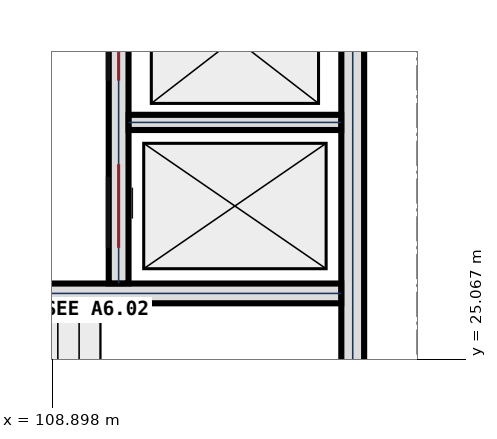
"""IFC4 building model, lengths in metres.
Left out: names, types, materials, properties, quantities, classifications, styles, units other than length and angle.
Written with IfcOpenShell. Run it as: python <this file> out.ifc"""

import sys

from ifc_helpers import new_model, si_unit, direction, frame, frame_2d, origin, place, context, subcontext, project, spatial, rectangle, extrude, element, fill, save


model = new_model("IFC4")
c1 = context("Model", 3, precision=1e-05, world=origin(), true_north=direction((0.0, 1.0)))
c2 = subcontext(c1, "Body", "Model", "MODEL_VIEW")
j1 = project(units=[si_unit("LENGTHUNIT", "METRE"), si_unit("PLANEANGLEUNIT", "RADIAN")], contexts=[c1])
p1 = place(None, origin())
s1 = spatial("IfcSite", under=j1, at=p1, CompositionType="ELEMENT")
p2 = place(p1, origin())
s2 = spatial("IfcBuilding", under=s1, at=p2, CompositionType="ELEMENT")
p3 = place(p2, frame((0.0, 0.0, -8.4)))
s3 = spatial("IfcBuildingStorey", under=s2, at=p3, CompositionType="ELEMENT", Elevation=-8.4)
p4 = place(p3, frame((112.85, 30.298, 0.0), z_axis=(0.0, 0.0, 1.0), x_axis=(0.0, -1.0, 0.0)))
e1 = element("IfcWall", 1, at=p4, inside=s3, PredefinedType="SHEAR", context=c2, shape_type="SweptSolid", body=[
    extrude(rectangle(XDim=7.796, YDim=0.3, at=frame_2d((3.898, 0.0))), origin(), (0.0, 0.0, 1.0), 4.2),
])
p5 = place(p3, frame((103.502, 25.93, 0.0), z_axis=(0.0, 0.0, 1.0), x_axis=(1.0, 0.0, 0.0)))
e2 = element("IfcWall", 2, at=p5, inside=s3, PredefinedType="SHEAR", context=c2, shape_type="SweptSolid", body=[
    extrude(rectangle(XDim=9.196, YDim=0.26, at=frame_2d((4.598, 0.0))), origin(), (0.0, 0.0, 1.0), 4.2),
])
p6 = place(p5, frame((1.598, 0.0, 0.0)))
e3 = element("IfcOpeningElement", 3, at=p6, cuts=e2, PredefinedType="OPENING", context=c2, shape_type="SweptSolid", body=[
    extrude(rectangle(XDim=1.2, YDim=2.2, at=frame_2d((0.6, 1.1))), frame((0.0, 0.14, 0.0), z_axis=(0.0, -1.0, 0.0), x_axis=(1.0, 0.0, 0.0)), (0.0, 0.0, 1.0), 0.28),
])
p7 = place(p5, frame((0.143, 0.0, 0.0)))
e4 = element("IfcOpeningElement", 4, at=p7, cuts=e2, PredefinedType="OPENING", context=c2, shape_type="SweptSolid", body=[
    extrude(rectangle(XDim=0.85, YDim=2.05, at=frame_2d((0.425, 1.025))), frame((0.0, 0.14, 0.0), z_axis=(0.0, -1.0, 0.0), x_axis=(1.0, 0.0, 0.0)), (0.0, 0.0, 1.0), 0.28),
])
p8 = place(p3, frame((109.77, 26.062, 0.0), z_axis=(0.0, 0.0, 1.0), x_axis=(0.0, 1.0, 0.0)))
e5 = element("IfcWall", 5, at=p8, inside=s3, PredefinedType="SHEAR", context=c2, shape_type="SweptSolid", body=[
    extrude(rectangle(XDim=4.236, YDim=0.26, at=frame_2d((2.118, 0.0))), origin(), (0.0, 0.0, 1.0), 4.2),
])
p9 = place(p8, frame((0.468, 0.0, 0.0)))
e6 = element("IfcOpeningElement", 6, at=p9, cuts=e5, PredefinedType="OPENING", context=c2, shape_type="SweptSolid", body=[
    extrude(rectangle(XDim=1.1, YDim=2.15, at=frame_2d((0.55, 1.075))), frame((0.0, 0.14, 0.0), z_axis=(0.0, -1.0, 0.0), x_axis=(1.0, 0.0, 0.0)), (0.0, 0.0, 1.0), 0.28),
])
p10 = place(p8, frame((2.668, 0.0, 0.0)))
e7 = element("IfcOpeningElement", 7, at=p10, cuts=e5, PredefinedType="OPENING", context=c2, shape_type="SweptSolid", body=[
    extrude(rectangle(XDim=1.1, YDim=2.15, at=frame_2d((0.55, 1.075))), frame((0.0, 0.14, 0.0), z_axis=(0.0, -1.0, 0.0), x_axis=(1.0, 0.0, 0.0)), (0.0, 0.0, 1.0), 0.28),
])
p11 = place(p3, frame((109.902, 28.18, 0.0), z_axis=(0.0, 0.0, 1.0), x_axis=(1.0, 0.0, 0.0)))
e8 = element("IfcWall", 8, at=p11, inside=s3, PredefinedType="PLUMBINGWALL", context=c2, shape_type="SweptSolid", body=[
    extrude(rectangle(XDim=2.796, YDim=0.2, at=frame_2d((1.398, 0.0))), origin(), (0.0, 0.0, 1.0), 3.86),
])
p12 = place(p9, origin())
e9 = element("IfcDoor", 9, at=p12, inside=s3, OperationType="SLIDING_TO_LEFT", PredefinedType="DOOR", context=c2, shape_type="SweptSolid", body=[
    extrude(rectangle(XDim=1.1, YDim=2.15, at=frame_2d((0.55, 1.075))), frame((0.0, 0.032, 0.0), z_axis=(0.0, -1.0, 0.0), x_axis=(1.0, 0.0, 0.0)), (0.0, 0.0, 1.0), 0.065),
])
fill(e6, e9)
p13 = place(p10, origin())
e10 = element("IfcDoor", 10, at=p13, inside=s3, OperationType="SLIDING_TO_LEFT", PredefinedType="DOOR", context=c2, shape_type="SweptSolid", body=[
    extrude(rectangle(XDim=1.1, YDim=2.15, at=frame_2d((0.55, 1.075))), frame((0.0, 0.032, 0.0), z_axis=(0.0, -1.0, 0.0), x_axis=(1.0, 0.0, 0.0)), (0.0, 0.0, 1.0), 0.065),
])
fill(e7, e10)
save(model, sys.argv[1])
